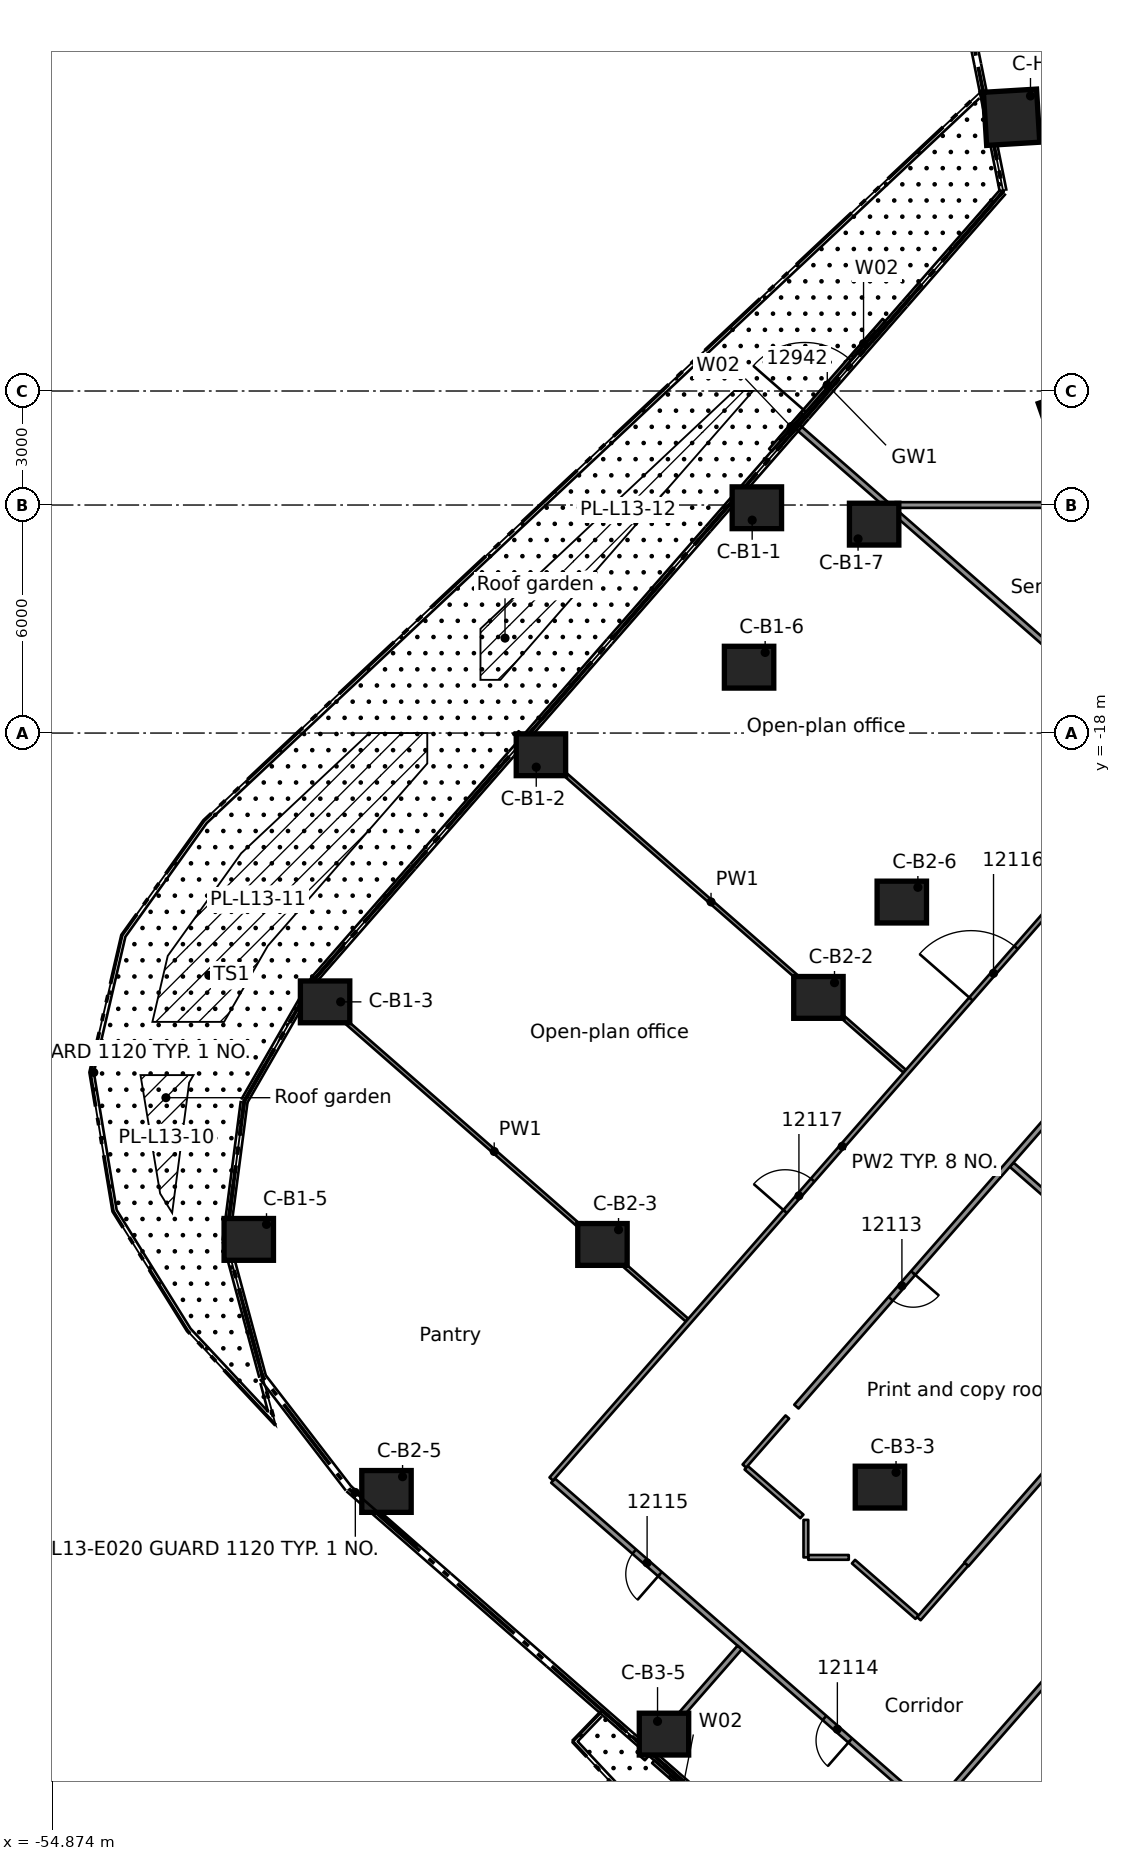
"""IFC4 building model, lengths in metres.
Left out: names, types, materials, properties, quantities, classifications, styles, units other than length and angle.
Written with IfcOpenShell. Run it as: python <this file> out.ifc"""

import sys

from ifc_helpers import new_model, si_unit, direction, frame, frame_2d, origin, origin_2d, place, context, subcontext, project, spatial, rectangle, extrude, element, fill, save


model = new_model("IFC4")
c1 = context("Model", 3, precision=1e-05, world=origin(), true_north=direction((0.0, 1.0)))
c2 = subcontext(c1, "Body", "Model", "MODEL_VIEW")
j1 = project(units=[si_unit("LENGTHUNIT", "METRE"), si_unit("PLANEANGLEUNIT", "RADIAN")], contexts=[c1])
p1 = place(None, origin())
s1 = spatial("IfcSite", under=j1, at=p1, CompositionType="ELEMENT")
p2 = place(p1, origin())
s2 = spatial("IfcBuilding", under=s1, at=p2, CompositionType="ELEMENT")
p3 = place(p2, frame((0.0, 0.0, 58.8)))
s3 = spatial("IfcBuildingStorey", under=s2, at=p3, CompositionType="ELEMENT", Elevation=58.8)
for number, where, z_axis, x_axis in (
    (1, (-36.327, -12.072, 0.0), (0.0, 0.0, 1.0), (1.0, 0.0, 0.0)),
    (2, (-42.009, -18.571, 0.0), (0.0, 0.0, 1.0), (1.0, 0.0, 0.0)),
    (3, (-47.689, -25.073, 0.0), (0.0, 0.0, 1.0), (1.0, 0.0, 0.0)),
    (4, (-49.697, -31.323, 0.0), (0.0, 0.0, 1.0), (1.0, 0.0, 0.0)),
    (5, (-36.532, -16.267, 0.0), (0.0, 0.0, 1.0), (1.0, 0.0, 0.0)),
    (6, (-33.241, -12.503, 0.0), (0.0, 0.0, 1.0), (1.0, 0.0, 0.0)),
    (7, (-34.707, -24.956, 0.0), (0.0, 0.0, 1.0), (1.0, 0.0, 0.0)),
    (8, (-40.39, -31.456, 0.0), (0.0, 0.0, 1.0), (1.0, 0.0, 0.0)),
    (9, (-46.073, -37.955, 0.0), (0.0, 0.0, 1.0), (1.0, 0.0, 0.0)),
    (10, (-32.513, -22.447, 0.0), (0.0, 0.0, 1.0), (1.0, 0.0, 0.0)),
    (11, (-33.088, -37.841, 0.0), (0.0, 0.0, 1.0), (1.0, 0.0, 0.0)),
    (12, (-38.771, -44.34, 0.0), (0.0, 0.0, 1.0), (1.0, 0.0, 0.0)),
):
    element("IfcColumn", number, at=place(p3, frame(where, z_axis=z_axis, x_axis=x_axis)), inside=s3, PredefinedType="COLUMN", context=c2, shape_type="SweptSolid", body=[
        extrude(rectangle(XDim=1.3, YDim=1.1, at=origin_2d()), origin(), (0.0, 0.0, 1.0), 3.5),
    ])
for number, where, z_axis, x_axis in (
    (13, (-28.029, -9.758, 0.0), (0.0, 0.0, 1.0), (-0.944, -0.329, 0.0)),
    (14, (-29.624, -1.797, 0.0), (0.0, 0.0, 1.0), (-0.998, -0.061, 0.0)),
):
    element("IfcColumn", number, at=place(p3, frame(where, z_axis=z_axis, x_axis=x_axis)), inside=s3, PredefinedType="COLUMN", context=c2, shape_type="SweptSolid", body=[
        extrude(rectangle(XDim=1.4, YDim=1.4, at=origin_2d()), origin(), (0.0, 0.0, 1.0), 3.5),
    ])
p4 = place(p3, frame((-35.318, -48.329, 0.0), z_axis=(0.0, 0.0, 1.0), x_axis=(-0.752811480685, 0.658236184472, 0.0)))
e15 = element("IfcWall", 15, at=p4, inside=s3, PredefinedType="STANDARD", context=c2, shape_type="SweptSolid", body=[
    extrude(rectangle(XDim=4.959, YDim=0.1, at=frame_2d((2.479, 0.0))), origin(), (0.0, 0.0, 1.0), 3.1),
])
p5 = place(p4, frame((1.579, 0.0, 0.0)))
e16 = element("IfcOpeningElement", 16, at=p5, cuts=e15, PredefinedType="OPENING", context=c2, shape_type="SweptSolid", body=[
    extrude(rectangle(XDim=1.8, YDim=2.4, at=frame_2d((0.9, 1.2))), frame((0.0, 0.06, 0.0), z_axis=(0.0, -1.0, 0.0), x_axis=(1.0, 0.0, 0.0)), (0.0, 0.0, 1.0), 0.12),
])
p6 = place(p4, frame((0.579, 0.0, 0.0)))
e17 = element("IfcOpeningElement", 17, at=p6, cuts=e15, PredefinedType="OPENING", context=c2, shape_type="SweptSolid", body=[
    extrude(rectangle(XDim=0.9, YDim=2.4, at=frame_2d((0.45, 1.2))), frame((0.0, 0.06, 0.0), z_axis=(0.0, -1.0, 0.0), x_axis=(1.0, 0.0, 0.0)), (0.0, 0.0, 1.0), 0.12),
])
p7 = place(p4, frame((3.479, 0.0, 0.0)))
e18 = element("IfcOpeningElement", 18, at=p7, cuts=e15, PredefinedType="OPENING", context=c2, shape_type="SweptSolid", body=[
    extrude(rectangle(XDim=0.9, YDim=2.4, at=frame_2d((0.45, 1.2))), frame((0.0, 0.06, 0.0), z_axis=(0.0, -1.0, 0.0), x_axis=(1.0, 0.0, 0.0)), (0.0, 0.0, 1.0), 0.12),
])
p8 = place(p3, frame((-35.968, -10.553, 0.0), z_axis=(0.0, 0.0, 1.0), x_axis=(0.658272283298, 0.752779915408, 0.0)))
e19 = element("IfcWall", 19, at=p8, inside=s3, PredefinedType="STANDARD", context=c2, shape_type="SweptSolid", body=[
    extrude(rectangle(XDim=4.539, YDim=0.1, at=frame_2d((2.27, 0.0))), origin(), (0.0, 0.0, 1.0), 3.1),
])
p9 = place(p8, frame((1.369, 0.0, 0.0)))
e20 = element("IfcOpeningElement", 20, at=p9, cuts=e19, PredefinedType="OPENING", context=c2, shape_type="SweptSolid", body=[
    extrude(rectangle(XDim=1.8, YDim=2.4, at=frame_2d((0.9, 1.2))), frame((0.0, 0.06, 0.0), z_axis=(0.0, -1.0, 0.0), x_axis=(1.0, 0.0, 0.0)), (0.0, 0.0, 1.0), 0.12),
])
p10 = place(p8, frame((0.369, 0.0, 0.0)))
e21 = element("IfcOpeningElement", 21, at=p10, cuts=e19, PredefinedType="OPENING", context=c2, shape_type="SweptSolid", body=[
    extrude(rectangle(XDim=0.9, YDim=2.4, at=frame_2d((0.45, 1.2))), frame((0.0, 0.06, 0.0), z_axis=(0.0, -1.0, 0.0), x_axis=(1.0, 0.0, 0.0)), (0.0, 0.0, 1.0), 0.12),
])
p11 = place(p8, frame((3.269, 0.0, 0.0)))
e22 = element("IfcOpeningElement", 22, at=p11, cuts=e19, PredefinedType="OPENING", context=c2, shape_type="SweptSolid", body=[
    extrude(rectangle(XDim=0.9, YDim=2.4, at=frame_2d((0.45, 1.2))), frame((0.0, 0.06, 0.0), z_axis=(0.0, -1.0, 0.0), x_axis=(1.0, 0.0, 0.0)), (0.0, 0.0, 1.0), 0.12),
])
p12 = place(p3, frame((-31.776, -46.338, 0.0), z_axis=(0.0, 0.0, 1.0), x_axis=(-0.752833887156, 0.658210557762, 0.0)))
e23 = element("IfcWall", 23, at=p12, inside=s3, PredefinedType="PARTITIONING", context=c2, shape_type="SweptSolid", body=[
    extrude(rectangle(XDim=13.169, YDim=0.15, at=frame_2d((6.584, 0.0))), origin(), (0.0, 0.0, 1.0), 3.08),
])
p13 = place(p12, frame((2.781, 0.0, 0.0)))
e24 = element("IfcOpeningElement", 24, at=p13, cuts=e23, PredefinedType="OPENING", context=c2, shape_type="SweptSolid", body=[
    extrude(rectangle(XDim=0.9, YDim=2.1, at=frame_2d((0.45, 1.05))), frame((0.0, 0.085, 0.0), z_axis=(0.0, -1.0, 0.0), x_axis=(1.0, 0.0, 0.0)), (0.0, 0.0, 1.0), 0.17),
])
p14 = place(p12, frame((9.432, 0.0, 0.0)))
e25 = element("IfcOpeningElement", 25, at=p14, cuts=e23, PredefinedType="OPENING", context=c2, shape_type="SweptSolid", body=[
    extrude(rectangle(XDim=0.9, YDim=2.1, at=frame_2d((0.45, 1.05))), frame((0.0, 0.085, 0.0), z_axis=(0.0, -1.0, 0.0), x_axis=(1.0, 0.0, 0.0)), (0.0, 0.0, 1.0), 0.17),
])
p15 = place(p3, frame((-33.784, -39.802, 0.0), z_axis=(0.0, 0.0, 1.0), x_axis=(0.753039994219, -0.657974746556, 0.0)))
e26 = element("IfcWall", 26, at=p15, inside=s3, PredefinedType="PARTITIONING", context=c2, shape_type="SweptSolid", body=[
    extrude(rectangle(XDim=2.219, YDim=0.125, at=frame_2d((1.109, 0.0))), origin(), (0.0, 0.0, 1.0), 3.08),
])
p16 = place(p3, frame((-48.313, -24.572, 0.0), z_axis=(0.0, 0.0, 1.0), x_axis=(0.752771849231, -0.658281507415, 0.0)))
e27 = element("IfcWall", 27, at=p16, inside=s3, PredefinedType="PARTITIONING", context=c2, shape_type="SweptSolid", body=[
    extrude(rectangle(XDim=13.482, YDim=0.1, at=frame_2d((6.741, 0.0))), origin(), (0.0, 0.0, 1.0), 3.08),
])
p17 = place(p3, frame((-42.628, -17.988, 0.0), z_axis=(0.0, 0.0, 1.0), x_axis=(0.752806813439, -0.658241522269, 0.0)))
e28 = element("IfcWall", 28, at=p17, inside=s3, PredefinedType="PARTITIONING", context=c2, shape_type="SweptSolid", body=[
    extrude(rectangle(XDim=13.536, YDim=0.1, at=frame_2d((6.768, 0.0))), origin(), (0.0, 0.0, 1.0), 3.08),
])
p18 = place(p3, frame((-29.623, -29.358, 0.0), z_axis=(0.0, 0.0, 1.0), x_axis=(0.75275458924, -0.6583012444, 0.0)))
e29 = element("IfcWall", 29, at=p18, inside=s3, PredefinedType="PARTITIONING", context=c2, shape_type="SweptSolid", body=[
    extrude(rectangle(XDim=5.95, YDim=0.15, at=frame_2d((2.975, 0.0))), origin(), (0.0, 0.0, 1.0), 3.08),
])
p19 = place(p3, frame((-35.281, -9.921, 0.0), z_axis=(0.0, 0.0, 1.0), x_axis=(0.752809357725, -0.658238612452, 0.0)))
e30 = element("IfcWall", 30, at=p19, inside=s3, PredefinedType="PARTITIONING", context=c2, shape_type="SweptSolid", body=[
    extrude(rectangle(XDim=13.778, YDim=0.15, at=frame_2d((6.889, 0.0))), origin(), (0.0, 0.0, 1.0), 3.08),
])
p20 = place(p3, frame((-36.609, -37.33, 0.0), z_axis=(0.0, 0.0, 1.0), x_axis=(0.752949220319, -0.658078621155, 0.0)))
e31 = element("IfcWall", 31, at=p20, inside=s3, PredefinedType="PARTITIONING", context=c2, shape_type="SweptSolid", body=[
    extrude(rectangle(XDim=1.948, YDim=0.125, at=frame_2d((0.974, 0.0))), origin(), (0.0, 0.0, 1.0), 3.08),
])
p21 = place(p3, frame((-34.974, -39.69, 0.0), z_axis=(0.0, 0.0, 1.0), x_axis=(1.0, 0.0, 0.0)))
e32 = element("IfcWall", 32, at=p21, inside=s3, PredefinedType="PARTITIONING", context=c2, shape_type="SweptSolid", body=[
    extrude(rectangle(XDim=1.065, YDim=0.125, at=frame_2d((0.533, 0.0))), origin(), (0.0, 0.0, 1.0), 3.08),
])
p22 = place(p3, frame((-32.705, -12.0, 0.0), z_axis=(0.0, 0.0, 1.0), x_axis=(1.0, 0.0, 0.0)))
e33 = element("IfcWall", 33, at=p22, inside=s3, PredefinedType="PARTITIONING", context=c2, shape_type="SweptSolid", body=[
    extrude(rectangle(XDim=10.58, YDim=0.15, at=frame_2d((5.29, 0.0))), origin(), (0.0, 0.0, 1.0), 3.08),
])
p23 = place(p3, frame((-31.724, -46.384, 0.0), z_axis=(0.0, 0.0, 1.0), x_axis=(0.65825296656, 0.752796806592, 0.0)))
e34 = element("IfcWall", 34, at=p23, inside=s3, PredefinedType="PARTITIONING", context=c2, shape_type="SweptSolid", body=[
    extrude(rectangle(XDim=5.015, YDim=0.15, at=frame_2d((2.507, 0.0))), origin(), (0.0, 0.0, 1.0), 3.08),
])
p24 = place(p3, frame((-30.815, -39.873, 0.0), z_axis=(0.0, 0.0, 1.0), x_axis=(0.658330873818, 0.752728676601, 0.0)))
e35 = element("IfcWall", 35, at=p24, inside=s3, PredefinedType="PARTITIONING", context=c2, shape_type="SweptSolid", body=[
    extrude(rectangle(XDim=18.805, YDim=0.15, at=frame_2d((9.402, 0.0))), origin(), (0.0, 0.0, 1.0), 3.08),
])
p25 = place(p24, frame((11.778, 0.0, 0.0)))
e36 = element("IfcOpeningElement", 36, at=p25, cuts=e35, PredefinedType="OPENING", context=c2, shape_type="SweptSolid", body=[
    extrude(rectangle(XDim=0.9, YDim=2.1, at=frame_2d((0.45, 1.05))), frame((0.0, 0.085, 0.0), z_axis=(0.0, -1.0, 0.0), x_axis=(1.0, 0.0, 0.0)), (0.0, 0.0, 1.0), 0.17),
])
p26 = place(p3, frame((-39.331, -44.979, 0.0), z_axis=(0.0, 0.0, 1.0), x_axis=(0.658308331331, 0.752748391496, 0.0)))
e37 = element("IfcWall", 37, at=p26, inside=s3, PredefinedType="PARTITIONING", context=c2, shape_type="SweptSolid", body=[
    extrude(rectangle(XDim=3.875, YDim=0.15, at=frame_2d((1.938, 0.0))), origin(), (0.0, 0.0, 1.0), 3.08),
])
p27 = place(p3, frame((-36.656, -37.287, 0.0), z_axis=(0.0, 0.0, 1.0), x_axis=(0.658987828895, 0.752153602244, 0.0)))
e38 = element("IfcWall", 38, at=p27, inside=s3, PredefinedType="PARTITIONING", context=c2, shape_type="SweptSolid", body=[
    extrude(rectangle(XDim=1.716, YDim=0.125, at=frame_2d((0.858, 0.0))), origin(), (0.0, 0.0, 1.0), 3.08),
])
p28 = place(p3, frame((-22.501, -21.097, 0.0), z_axis=(0.0, 0.0, 1.0), x_axis=(-0.658166451888, -0.752872447104, 0.0)))
e39 = element("IfcWall", 39, at=p28, inside=s3, PredefinedType="PARTITIONING", context=c2, shape_type="SweptSolid", body=[
    extrude(rectangle(XDim=19.427, YDim=0.15, at=frame_2d((9.713, 0.0))), origin(), (0.0, 0.0, 1.0), 3.08),
])
p29 = place(p28, frame((2.35, 0.0, 0.0)))
e40 = element("IfcOpeningElement", 40, at=p29, cuts=e39, PredefinedType="OPENING", context=c2, shape_type="SweptSolid", body=[
    extrude(rectangle(XDim=0.9, YDim=2.1, at=frame_2d((0.45, 1.05))), frame((0.0, 0.085, 0.0), z_axis=(0.0, -1.0, 0.0), x_axis=(1.0, 0.0, 0.0)), (0.0, 0.0, 1.0), 0.17),
])
p30 = place(p28, frame((14.757, 0.0, 0.0)))
e41 = element("IfcOpeningElement", 41, at=p30, cuts=e39, PredefinedType="OPENING", context=c2, shape_type="SweptSolid", body=[
    extrude(rectangle(XDim=0.9, YDim=2.1, at=frame_2d((0.45, 1.05))), frame((0.0, 0.085, 0.0), z_axis=(0.0, -1.0, 0.0), x_axis=(1.0, 0.0, 0.0)), (0.0, 0.0, 1.0), 0.17),
])
p31 = place(p3, frame((-41.737, -37.628, 0.0), z_axis=(0.0, 0.0, 1.0), x_axis=(0.658317287272, 0.752740559076, 0.0)))
e42 = element("IfcWall", 42, at=p31, inside=s3, PredefinedType="PARTITIONING", context=c2, shape_type="SweptSolid", body=[
    extrude(rectangle(XDim=23.255, YDim=0.125, at=frame_2d((11.627, 0.0))), origin(), (0.0, 0.0, 1.0), 3.08),
])
p32 = place(p31, frame((16.778, 0.0, 0.0)))
e43 = element("IfcOpeningElement", 43, at=p32, cuts=e42, PredefinedType="OPENING", context=c2, shape_type="SweptSolid", body=[
    extrude(rectangle(XDim=1.8, YDim=2.1, at=frame_2d((0.9, 1.05))), frame((0.0, 0.073, 0.0), z_axis=(0.0, -1.0, 0.0), x_axis=(1.0, 0.0, 0.0)), (0.0, 0.0, 1.0), 0.145),
])
p33 = place(p31, frame((9.35, 0.0, 0.0)))
e44 = element("IfcOpeningElement", 44, at=p33, cuts=e42, PredefinedType="OPENING", context=c2, shape_type="SweptSolid", body=[
    extrude(rectangle(XDim=1.1, YDim=2.1, at=frame_2d((0.55, 1.05))), frame((0.0, 0.073, 0.0), z_axis=(0.0, -1.0, 0.0), x_axis=(1.0, 0.0, 0.0)), (0.0, 0.0, 1.0), 0.145),
])
p34 = place(p3, frame((-32.064, -41.303, 0.0), z_axis=(0.0, 0.0, 1.0), x_axis=(0.65785800939, 0.753141978303, 0.0)))
e45 = element("IfcWall", 45, at=p34, inside=s3, PredefinedType="PARTITIONING", context=c2, shape_type="SweptSolid", body=[
    extrude(rectangle(XDim=1.899, YDim=0.125, at=frame_2d((0.949, 0.0))), origin(), (0.0, 0.0, 1.0), 3.08),
])
p35 = place(p3, frame((-35.037, -39.69, 0.0), z_axis=(0.0, 0.0, 1.0), x_axis=(0.0, 1.0, 0.0)))
e46 = element("IfcWall", 46, at=p35, inside=s3, PredefinedType="PARTITIONING", context=c2, shape_type="SweptSolid", body=[
    extrude(rectangle(XDim=0.986, YDim=0.125, at=frame_2d((0.493, 0.0))), origin(), (0.0, 0.0, 1.0), 3.08),
])
p36 = place(p7, origin())
e47 = element("IfcWindow", 47, at=p36, inside=s3, PartitioningType="SINGLE_PANEL", PredefinedType="WINDOW", context=c2, shape_type="SweptSolid", body=[
    extrude(rectangle(XDim=0.9, YDim=2.4, at=frame_2d((0.45, 1.2))), frame((0.0, 0.03, 0.0), z_axis=(0.0, -1.0, 0.0), x_axis=(1.0, 0.0, 0.0)), (0.0, 0.0, 1.0), 0.06),
])
fill(e18, e47)
p37 = place(p9, origin())
e48 = element("IfcDoor", 48, at=p37, inside=s3, OperationType="DOUBLE_DOOR_SINGLE_SWING", PredefinedType="DOOR", context=c2, shape_type="SweptSolid", body=[
    extrude(rectangle(XDim=1.8, YDim=2.4, at=frame_2d((0.9, 1.2))), frame((0.0, 0.025, 0.0), z_axis=(0.0, -1.0, 0.0), x_axis=(1.0, 0.0, 0.0)), (0.0, 0.0, 1.0), 0.05),
])
fill(e20, e48)
p38 = place(p10, origin())
e49 = element("IfcWindow", 49, at=p38, inside=s3, PartitioningType="SINGLE_PANEL", PredefinedType="WINDOW", context=c2, shape_type="SweptSolid", body=[
    extrude(rectangle(XDim=0.9, YDim=2.4, at=frame_2d((0.45, 1.2))), frame((0.0, 0.03, 0.0), z_axis=(0.0, -1.0, 0.0), x_axis=(1.0, 0.0, 0.0)), (0.0, 0.0, 1.0), 0.06),
])
fill(e21, e49)
p39 = place(p11, origin())
e50 = element("IfcWindow", 50, at=p39, inside=s3, PartitioningType="SINGLE_PANEL", PredefinedType="WINDOW", context=c2, shape_type="SweptSolid", body=[
    extrude(rectangle(XDim=0.9, YDim=2.4, at=frame_2d((0.45, 1.2))), frame((0.0, 0.03, 0.0), z_axis=(0.0, -1.0, 0.0), x_axis=(1.0, 0.0, 0.0)), (0.0, 0.0, 1.0), 0.06),
])
fill(e22, e50)
p40 = place(p30, origin())
e51 = element("IfcDoor", 51, at=p40, inside=s3, OperationType="SINGLE_SWING_RIGHT", PredefinedType="DOOR", context=c2, shape_type="SweptSolid", body=[
    extrude(rectangle(XDim=0.9, YDim=2.1, at=frame_2d((0.45, 1.05))), frame((0.0, 0.025, 0.0), z_axis=(0.0, -1.0, 0.0), x_axis=(1.0, 0.0, 0.0)), (0.0, 0.0, 1.0), 0.05),
])
fill(e41, e51)
p41 = place(p13, origin())
e52 = element("IfcDoor", 52, at=p41, inside=s3, OperationType="SINGLE_SWING_LEFT", PredefinedType="DOOR", context=c2, shape_type="SweptSolid", body=[
    extrude(rectangle(XDim=0.9, YDim=2.1, at=frame_2d((0.45, 1.05))), frame((0.0, 0.025, 0.0), z_axis=(0.0, -1.0, 0.0), x_axis=(1.0, 0.0, 0.0)), (0.0, 0.0, 1.0), 0.05),
])
fill(e24, e52)
p42 = place(p14, origin())
e53 = element("IfcDoor", 53, at=p42, inside=s3, OperationType="SINGLE_SWING_RIGHT", PredefinedType="DOOR", context=c2, shape_type="SweptSolid", body=[
    extrude(rectangle(XDim=0.9, YDim=2.1, at=frame_2d((0.45, 1.05))), frame((0.0, 0.025, 0.0), z_axis=(0.0, -1.0, 0.0), x_axis=(1.0, 0.0, 0.0)), (0.0, 0.0, 1.0), 0.05),
])
fill(e25, e53)
p43 = place(p32, origin())
e54 = element("IfcDoor", 54, at=p43, inside=s3, OperationType="DOUBLE_DOOR_SINGLE_SWING", PredefinedType="DOOR", context=c2, shape_type="SweptSolid", body=[
    extrude(rectangle(XDim=1.8, YDim=2.1, at=frame_2d((0.9, 1.05))), frame((0.0, 0.025, 0.0), z_axis=(0.0, -1.0, 0.0), x_axis=(1.0, 0.0, 0.0)), (0.0, 0.0, 1.0), 0.05),
])
fill(e43, e54)
p44 = place(p33, origin())
e55 = element("IfcDoor", 55, at=p44, inside=s3, OperationType="SINGLE_SWING_LEFT", PredefinedType="DOOR", context=c2, shape_type="SweptSolid", body=[
    extrude(rectangle(XDim=1.1, YDim=2.1, at=frame_2d((0.55, 1.05))), frame((0.0, 0.025, 0.0), z_axis=(0.0, -1.0, 0.0), x_axis=(1.0, 0.0, 0.0)), (0.0, 0.0, 1.0), 0.05),
])
fill(e44, e55)
save(model, sys.argv[1])
